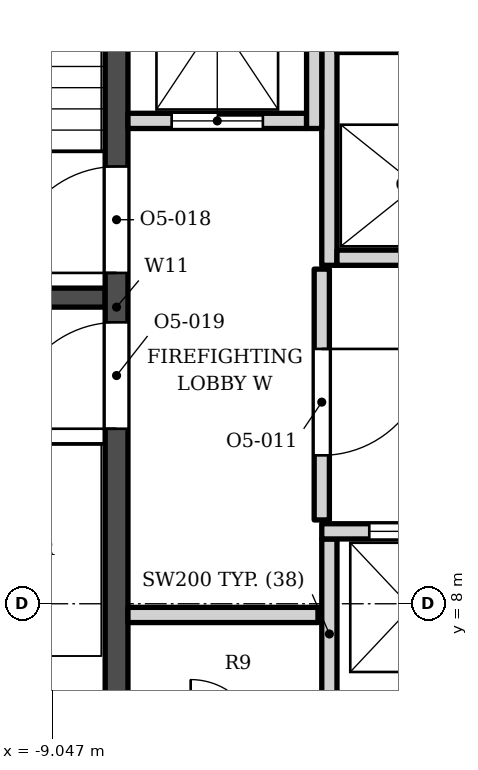
"""IFC4 building model, lengths in metres.
Left out: names, types, materials, properties, quantities, classifications, styles, units other than length and angle.
Written with IfcOpenShell. Run it as: python <this file> out.ifc"""

import sys

from ifc_helpers import new_model, si_unit, direction, frame, frame_2d, origin, place, context, subcontext, project, spatial, rectangle, extrude, element, fill, save


model = new_model("IFC4")
c1 = context("Model", 3, precision=1e-05, world=origin(), true_north=direction((0.0, 1.0)))
c2 = subcontext(c1, "Body", "Model", "MODEL_VIEW")
j1 = project(units=[si_unit("LENGTHUNIT", "METRE"), si_unit("PLANEANGLEUNIT", "RADIAN")], contexts=[c1])
p1 = place(None, origin())
s1 = spatial("IfcSite", under=j1, at=p1, CompositionType="ELEMENT")
p2 = place(p1, origin())
s2 = spatial("IfcBuilding", under=s1, at=p2, CompositionType="ELEMENT")
p3 = place(p2, frame((0.0, 0.0, 196.4)))
s3 = spatial("IfcBuildingStorey", under=s2, at=p3, CompositionType="ELEMENT", Elevation=196.4)
p4 = place(p3, frame((-8.2, 5.253, 0.0), z_axis=(0.0, 0.0, 1.0), x_axis=(0.0, 1.0, 0.0)))
e1 = element("IfcWall", 1, at=p4, inside=s3, PredefinedType="SHEAR", context=c2, shape_type="SweptSolid", body=[
    extrude(rectangle(XDim=13.3, YDim=0.3, at=frame_2d((6.65, 0.0))), origin(), (0.0, 0.0, 1.0), 3.9),
])
p5 = place(p4, frame((7.1, 0.0, 0.0)))
e2 = element("IfcOpeningElement", 2, at=p5, cuts=e1, PredefinedType="OPENING", context=c2, shape_type="SweptSolid", body=[
    extrude(rectangle(XDim=1.4, YDim=2.1, at=frame_2d((0.7, 1.05))), frame((0.0, 0.16, 0.0), z_axis=(0.0, -1.0, 0.0), x_axis=(1.0, 0.0, 0.0)), (0.0, 0.0, 1.0), 0.32),
])
p6 = place(p4, frame((5.05, 0.0, 0.0)))
e3 = element("IfcOpeningElement", 3, at=p6, cuts=e1, PredefinedType="OPENING", context=c2, shape_type="SweptSolid", body=[
    extrude(rectangle(XDim=1.4, YDim=2.1, at=frame_2d((0.7, 1.05))), frame((0.0, 0.16, 0.0), z_axis=(0.0, -1.0, 0.0), x_axis=(1.0, 0.0, 0.0)), (0.0, 0.0, 1.0), 0.32),
])
p7 = place(p3, frame((-12.1, 12.028, 0.0), z_axis=(0.0, 0.0, 1.0), x_axis=(1.0, 0.0, 0.0)))
e4 = element("IfcWall", 4, at=p7, inside=s3, PredefinedType="SHEAR", context=c2, shape_type="SweptSolid", body=[
    extrude(rectangle(XDim=3.75, YDim=0.25, at=frame_2d((1.875, 0.0))), origin(), (0.0, 0.0, 1.0), 3.9),
])
for number, where, z_axis, x_axis in (
    (5, (-5.4, 6.353, 0.0), (0.0, 0.0, 1.0), (0.0, 1.0, 0.0)),
    (6, (-8.05, 7.853, 0.0), (0.0, 0.0, 1.0), (1.0, 0.0, 0.0)),
):
    element("IfcWall", number, at=place(p3, frame(where, z_axis=z_axis, x_axis=x_axis)), inside=s3, PredefinedType="SOLIDWALL", context=c2, shape_type="SweptSolid", body=[
        extrude(rectangle(XDim=2.5, YDim=0.2, at=frame_2d((1.25, 0.0))), origin(), (0.0, 0.0, 1.0), 3.73),
    ])
p8 = place(p3, frame((-5.5, 8.953, 0.0), z_axis=(0.0, 0.0, 1.0), x_axis=(1.0, 0.0, 0.0)))
e7 = element("IfcWall", 7, at=p8, inside=s3, PredefinedType="SOLIDWALL", context=c2, shape_type="SweptSolid", body=[
    extrude(rectangle(XDim=4.5, YDim=0.2, at=frame_2d((2.25, 0.0))), origin(), (0.0, 0.0, 1.0), 3.73),
])
p9 = place(p8, frame((0.625, 0.0, 0.0)))
e8 = element("IfcOpeningElement", 8, at=p9, cuts=e7, PredefinedType="OPENING", context=c2, shape_type="SweptSolid", body=[
    extrude(rectangle(XDim=1.1, YDim=2.1, at=frame_2d((0.55, 1.05))), frame((0.0, 0.11, 0.0), z_axis=(0.0, -1.0, 0.0), x_axis=(1.0, 0.0, 0.0)), (0.0, 0.0, 1.0), 0.22),
])
p10 = place(p8, frame((2.775, 0.0, 0.0)))
e9 = element("IfcOpeningElement", 9, at=p10, cuts=e7, PredefinedType="OPENING", context=c2, shape_type="SweptSolid", body=[
    extrude(rectangle(XDim=1.1, YDim=2.1, at=frame_2d((0.55, 1.05))), frame((0.0, 0.11, 0.0), z_axis=(0.0, -1.0, 0.0), x_axis=(1.0, 0.0, 0.0)), (0.0, 0.0, 1.0), 0.22),
])
p11 = place(p3, frame((-5.5, 9.103, 0.0), z_axis=(0.0, 0.0, 1.0), x_axis=(0.0, 1.0, 0.0)))
e10 = element("IfcWall", 10, at=p11, inside=s3, PredefinedType="SOLIDWALL", context=c2, shape_type="SweptSolid", body=[
    extrude(rectangle(XDim=3.3, YDim=0.2, at=frame_2d((1.65, 0.0))), origin(), (0.0, 0.0, 1.0), 3.73),
])
p12 = place(p11, frame((0.85, 0.0, 0.0)))
e11 = element("IfcOpeningElement", 11, at=p12, cuts=e10, PredefinedType="OPENING", context=c2, shape_type="SweptSolid", body=[
    extrude(rectangle(XDim=1.4, YDim=2.1, at=frame_2d((0.7, 1.05))), frame((0.0, 0.11, 0.0), z_axis=(0.0, -1.0, 0.0), x_axis=(1.0, 0.0, 0.0)), (0.0, 0.0, 1.0), 0.22),
])
p13 = place(p3, frame((-5.4, 12.453, 0.0), z_axis=(0.0, 0.0, 1.0), x_axis=(0.0, 1.0, 0.0)))
e12 = element("IfcWall", 12, at=p13, inside=s3, PredefinedType="SOLIDWALL", context=c2, shape_type="SweptSolid", body=[
    extrude(rectangle(XDim=3.0, YDim=0.2, at=frame_2d((1.5, 0.0))), origin(), (0.0, 0.0, 1.0), 3.73),
])
p14 = place(p3, frame((-5.3, 12.552, 0.0), z_axis=(0.0, 0.0, 1.0), x_axis=(1.0, 0.0, 0.0)))
e13 = element("IfcWall", 13, at=p14, inside=s3, PredefinedType="SOLIDWALL", context=c2, shape_type="SweptSolid", body=[
    extrude(rectangle(XDim=2.1, YDim=0.2, at=frame_2d((1.05, 0.0))), origin(), (0.0, 0.0, 1.0), 3.73),
])
p15 = place(p3, frame((-8.05, 14.353, 0.0), z_axis=(0.0, 0.0, 1.0), x_axis=(1.0, 0.0, 0.0)))
e14 = element("IfcWall", 14, at=p15, inside=s3, PredefinedType="SOLIDWALL", context=c2, shape_type="SweptSolid", body=[
    extrude(rectangle(XDim=2.35, YDim=0.2, at=frame_2d((1.175, 0.0))), origin(), (0.0, 0.0, 1.0), 3.73),
])
p16 = place(p15, frame((0.575, 0.0, 0.0)))
e15 = element("IfcOpeningElement", 15, at=p16, cuts=e14, PredefinedType="OPENING", context=c2, shape_type="SweptSolid", body=[
    extrude(rectangle(XDim=1.2, YDim=2.1, at=frame_2d((0.6, 1.05))), frame((0.0, 0.11, 0.0), z_axis=(0.0, -1.0, 0.0), x_axis=(1.0, 0.0, 0.0)), (0.0, 0.0, 1.0), 0.22),
])
p17 = place(p3, frame((-5.6, 14.253, 0.0), z_axis=(0.0, 0.0, 1.0), x_axis=(0.0, 1.0, 0.0)))
e16 = element("IfcWall", 16, at=p17, inside=s3, PredefinedType="SOLIDWALL", context=c2, shape_type="SweptSolid", body=[
    extrude(rectangle(XDim=4.3, YDim=0.2, at=frame_2d((2.15, 0.0))), origin(), (0.0, 0.0, 1.0), 3.73),
])
p18 = place(p3, frame((-5.3, 15.353, 0.0), z_axis=(0.0, 0.0, 1.0), x_axis=(1.0, 0.0, 0.0)))
e17 = element("IfcWall", 17, at=p18, inside=s3, PredefinedType="SOLIDWALL", context=c2, shape_type="SweptSolid", body=[
    extrude(rectangle(XDim=2.1, YDim=0.2, at=frame_2d((1.05, 0.0))), origin(), (0.0, 0.0, 1.0), 3.73),
])
p19 = place(p9, origin())
e18 = element("IfcDoor", 18, at=p19, inside=s3, OperationType="DOUBLE_DOOR_SLIDING", PredefinedType="DOOR", context=c2, shape_type="SweptSolid", body=[
    extrude(rectangle(XDim=1.1, YDim=2.1, at=frame_2d((0.55, 1.05))), frame((0.0, 0.025, 0.0), z_axis=(0.0, -1.0, 0.0), x_axis=(1.0, 0.0, 0.0)), (0.0, 0.0, 1.0), 0.05),
])
fill(e8, e18)
p20 = place(p16, origin())
e19 = element("IfcDoor", 19, at=p20, inside=s3, OperationType="DOUBLE_DOOR_SLIDING", PredefinedType="DOOR", context=c2, shape_type="SweptSolid", body=[
    extrude(rectangle(XDim=1.2, YDim=2.1, at=frame_2d((0.6, 1.05))), frame((0.0, 0.025, 0.0), z_axis=(0.0, -1.0, 0.0), x_axis=(1.0, 0.0, 0.0)), (0.0, 0.0, 1.0), 0.05),
])
fill(e15, e19)
p21 = place(p5, origin())
e20 = element("IfcDoor", 20, at=p21, inside=s3, OperationType="SINGLE_SWING_LEFT", PredefinedType="DOOR", context=c2, shape_type="SweptSolid", body=[
    extrude(rectangle(XDim=1.4, YDim=2.1, at=frame_2d((0.7, 1.05))), frame((0.0, 0.025, 0.0), z_axis=(0.0, -1.0, 0.0), x_axis=(1.0, 0.0, 0.0)), (0.0, 0.0, 1.0), 0.05),
])
fill(e2, e20)
p22 = place(p6, origin())
e21 = element("IfcDoor", 21, at=p22, inside=s3, OperationType="SINGLE_SWING_LEFT", PredefinedType="DOOR", context=c2, shape_type="SweptSolid", body=[
    extrude(rectangle(XDim=1.4, YDim=2.1, at=frame_2d((0.7, 1.05))), frame((0.0, 0.025, 0.0), z_axis=(0.0, -1.0, 0.0), x_axis=(1.0, 0.0, 0.0)), (0.0, 0.0, 1.0), 0.05),
])
fill(e3, e21)
p23 = place(p12, origin())
e22 = element("IfcDoor", 22, at=p23, inside=s3, OperationType="SINGLE_SWING_RIGHT", PredefinedType="DOOR", context=c2, shape_type="SweptSolid", body=[
    extrude(rectangle(XDim=1.4, YDim=2.1, at=frame_2d((0.7, 1.05))), frame((0.0, 0.025, 0.0), z_axis=(0.0, -1.0, 0.0), x_axis=(1.0, 0.0, 0.0)), (0.0, 0.0, 1.0), 0.05),
])
fill(e11, e22)
save(model, sys.argv[1])
